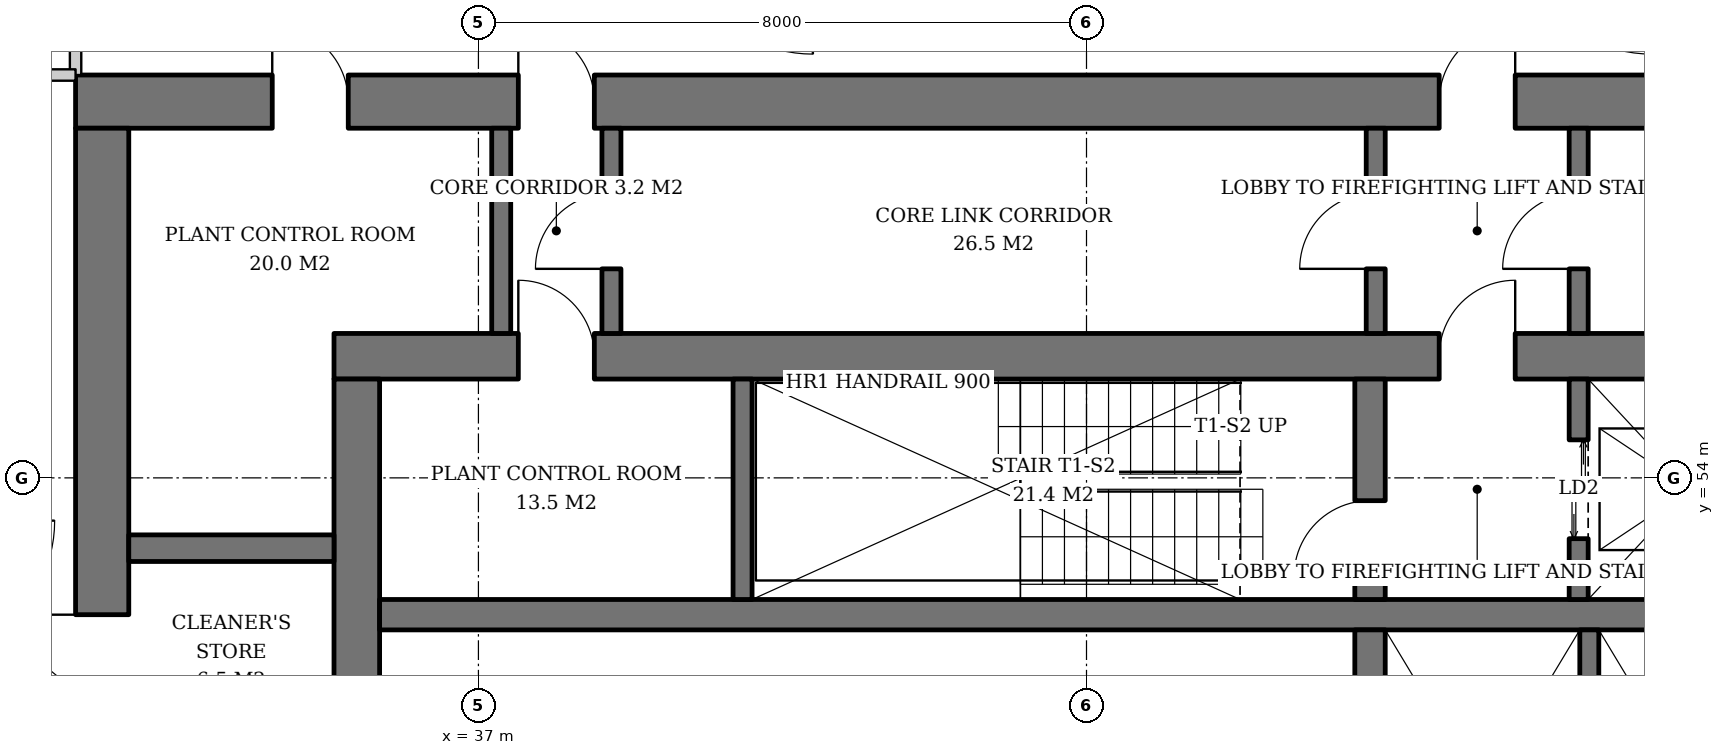
"""IFC4 building model, lengths in metres.
Left out: names, types, materials, properties, quantities, classifications, styles, units other than length and angle.
Written with IfcOpenShell. Run it as: python <this file> out.ifc"""

import sys

from ifc_helpers import new_model, si_unit, direction, frame, frame_2d, origin, origin_2d, place, context, subcontext, project, spatial, rectangle, extrude, element, fill, save


model = new_model("IFC4")
c1 = context("Model", 3, precision=1e-05, world=origin(), true_north=direction((0.0, 1.0)))
c2 = subcontext(c1, "Body", "Model", "MODEL_VIEW")
j1 = project(units=[si_unit("LENGTHUNIT", "METRE"), si_unit("PLANEANGLEUNIT", "RADIAN")], contexts=[c1])
p1 = place(None, origin())
s1 = spatial("IfcSite", under=j1, at=p1, CompositionType="ELEMENT")
p2 = place(p1, origin())
s2 = spatial("IfcBuilding", under=s1, at=p2, CompositionType="ELEMENT")
p3 = place(p2, frame((0.0, 0.0, 157.8)))
s3 = spatial("IfcBuildingStorey", under=s2, at=p3, CompositionType="ELEMENT", Elevation=157.8)
p4 = place(p3, frame((29.471, 61.529, 0.0), z_axis=(0.031898107953, -0.031898107953, 0.998981992539), x_axis=(0.707106781187, 0.707106781187, 0.0)))
e1 = element("IfcColumn", 1, at=p4, inside=s3, PredefinedType="COLUMN", context=c2, shape_type="SweptSolid", body=[
    extrude(rectangle(XDim=2.6, YDim=2.6, at=origin_2d()), origin(), (0.0, 0.0, 1.0), 3.804),
])
p5 = place(p3, frame((35.1, 55.6, 0.0), z_axis=(0.0, 0.0, 1.0), x_axis=(1.0, 0.0, 0.0)))
e2 = element("IfcWall", 2, at=p5, inside=s3, PredefinedType="SHEAR", context=c2, shape_type="SweptSolid", body=[
    extrude(rectangle(XDim=19.8, YDim=0.6, at=frame_2d((9.9, 0.0))), origin(), (0.0, 0.0, 1.0), 3.8),
])
p6 = place(p5, frame((14.54, 0.0, 0.0)))
e3 = element("IfcOpeningElement", 3, at=p6, cuts=e2, PredefinedType="OPENING", context=c2, shape_type="SweptSolid", body=[
    extrude(rectangle(XDim=1.0, YDim=2.1, at=frame_2d((0.5, 1.05))), frame((0.0, 0.31, 0.0), z_axis=(0.0, -1.0, 0.0), x_axis=(1.0, 0.0, 0.0)), (0.0, 0.0, 1.0), 0.62),
])
p7 = place(p5, frame((2.425, 0.0, 0.0)))
e4 = element("IfcOpeningElement", 4, at=p7, cuts=e2, PredefinedType="OPENING", context=c2, shape_type="SweptSolid", body=[
    extrude(rectangle(XDim=1.0, YDim=2.1, at=frame_2d((0.5, 1.05))), frame((0.0, 0.31, 0.0), z_axis=(0.0, -1.0, 0.0), x_axis=(1.0, 0.0, 0.0)), (0.0, 0.0, 1.0), 0.62),
])
p8 = place(p3, frame((35.4, 36.7, 0.0), z_axis=(0.0, 0.0, 1.0), x_axis=(0.0, 1.0, 0.0)))
e5 = element("IfcWall", 5, at=p8, inside=s3, PredefinedType="SHEAR", context=c2, shape_type="SweptSolid", body=[
    extrude(rectangle(XDim=18.6, YDim=0.6, at=frame_2d((9.3, 0.0))), origin(), (0.0, 0.0, 1.0), 3.8),
])
p9 = place(p8, frame((8.4, 0.0, 0.0)))
e6 = element("IfcOpeningElement", 6, at=p9, cuts=e5, PredefinedType="OPENING", context=c2, shape_type="SweptSolid", body=[
    extrude(rectangle(XDim=1.8, YDim=2.4, at=frame_2d((0.9, 1.2))), frame((0.0, 0.31, 0.0), z_axis=(0.0, -1.0, 0.0), x_axis=(1.0, 0.0, 0.0)), (0.0, 0.0, 1.0), 0.62),
])
p10 = place(p3, frame((31.7, 58.95, 0.0), z_axis=(0.0, 0.0, 1.0), x_axis=(1.0, 0.0, 0.0)))
e7 = element("IfcWall", 7, at=p10, inside=s3, PredefinedType="SHEAR", context=c2, shape_type="SweptSolid", body=[
    extrude(rectangle(XDim=26.6, YDim=0.7, at=frame_2d((13.3, 0.0))), origin(), (0.0, 0.0, 1.0), 3.8),
])
p11 = place(p10, frame((17.94, 0.0, 0.0)))
e8 = element("IfcOpeningElement", 8, at=p11, cuts=e7, PredefinedType="OPENING", context=c2, shape_type="SweptSolid", body=[
    extrude(rectangle(XDim=1.0, YDim=2.1, at=frame_2d((0.5, 1.05))), frame((0.0, 0.36, 0.0), z_axis=(0.0, -1.0, 0.0), x_axis=(1.0, 0.0, 0.0)), (0.0, 0.0, 1.0), 0.72),
])
p12 = place(p10, frame((5.825, 0.0, 0.0)))
e9 = element("IfcOpeningElement", 9, at=p12, cuts=e7, PredefinedType="OPENING", context=c2, shape_type="SweptSolid", body=[
    extrude(rectangle(XDim=1.0, YDim=2.1, at=frame_2d((0.5, 1.05))), frame((0.0, 0.36, 0.0), z_axis=(0.0, -1.0, 0.0), x_axis=(1.0, 0.0, 0.0)), (0.0, 0.0, 1.0), 0.72),
])
p13 = place(p10, frame((2.587, 0.0, 0.0)))
e10 = element("IfcOpeningElement", 10, at=p13, cuts=e7, PredefinedType="OPENING", context=c2, shape_type="SweptSolid", body=[
    extrude(rectangle(XDim=1.0, YDim=2.1, at=frame_2d((0.5, 1.05))), frame((0.0, 0.36, 0.0), z_axis=(0.0, -1.0, 0.0), x_axis=(1.0, 0.0, 0.0)), (0.0, 0.0, 1.0), 0.72),
])
p14 = place(p3, frame((32.05, 33.4, 0.0), z_axis=(0.0, 0.0, 1.0), x_axis=(0.0, 1.0, 0.0)))
e11 = element("IfcWall", 11, at=p14, inside=s3, PredefinedType="SHEAR", context=c2, shape_type="SweptSolid", body=[
    extrude(rectangle(XDim=25.2, YDim=0.7, at=frame_2d((12.6, 0.0))), origin(), (0.0, 0.0, 1.0), 3.8),
])
p15 = place(p14, frame((11.7, 0.0, 0.0)))
e12 = element("IfcOpeningElement", 12, at=p15, cuts=e11, PredefinedType="OPENING", context=c2, shape_type="SweptSolid", body=[
    extrude(rectangle(XDim=1.8, YDim=2.4, at=frame_2d((0.9, 1.2))), frame((0.0, 0.36, 0.0), z_axis=(0.0, -1.0, 0.0), x_axis=(1.0, 0.0, 0.0)), (0.0, 0.0, 1.0), 0.72),
])
p16 = place(p14, frame((3.575, 0.0, 0.0)))
e13 = element("IfcOpeningElement", 13, at=p16, cuts=e11, PredefinedType="OPENING", context=c2, shape_type="SweptSolid", body=[
    extrude(rectangle(XDim=1.0, YDim=2.1, at=frame_2d((0.5, 1.05))), frame((0.0, 0.36, 0.0), z_axis=(0.0, -1.0, 0.0), x_axis=(1.0, 0.0, 0.0)), (0.0, 0.0, 1.0), 0.72),
])
p17 = place(p14, frame((6.375, 0.0, 0.0)))
e14 = element("IfcOpeningElement", 14, at=p17, cuts=e11, PredefinedType="OPENING", context=c2, shape_type="SweptSolid", body=[
    extrude(rectangle(XDim=1.0, YDim=2.1, at=frame_2d((0.5, 1.05))), frame((0.0, 0.36, 0.0), z_axis=(0.0, -1.0, 0.0), x_axis=(1.0, 0.0, 0.0)), (0.0, 0.0, 1.0), 0.72),
])
p18 = place(p14, frame((9.1, 0.0, 0.0)))
e15 = element("IfcOpeningElement", 15, at=p18, cuts=e11, PredefinedType="OPENING", context=c2, shape_type="SweptSolid", body=[
    extrude(rectangle(XDim=1.0, YDim=2.1, at=frame_2d((0.5, 1.05))), frame((0.0, 0.36, 0.0), z_axis=(0.0, -1.0, 0.0), x_axis=(1.0, 0.0, 0.0)), (0.0, 0.0, 1.0), 0.72),
])
p19 = place(p14, frame((15.1, 0.0, 0.0)))
e16 = element("IfcOpeningElement", 16, at=p19, cuts=e11, PredefinedType="OPENING", context=c2, shape_type="SweptSolid", body=[
    extrude(rectangle(XDim=1.0, YDim=2.1, at=frame_2d((0.5, 1.05))), frame((0.0, 0.36, 0.0), z_axis=(0.0, -1.0, 0.0), x_axis=(1.0, 0.0, 0.0)), (0.0, 0.0, 1.0), 0.72),
])
p20 = place(p14, frame((17.8, 0.0, 0.0)))
e17 = element("IfcOpeningElement", 17, at=p20, cuts=e11, PredefinedType="OPENING", context=c2, shape_type="SweptSolid", body=[
    extrude(rectangle(XDim=1.0, YDim=2.1, at=frame_2d((0.5, 1.05))), frame((0.0, 0.36, 0.0), z_axis=(0.0, -1.0, 0.0), x_axis=(1.0, 0.0, 0.0)), (0.0, 0.0, 1.0), 0.72),
])
p21 = place(p3, frame((35.7, 52.2, 0.0), z_axis=(0.0, 0.0, 1.0), x_axis=(1.0, 0.0, 0.0)))
e18 = element("IfcWall", 18, at=p21, inside=s3, PredefinedType="SHEAR", context=c2, shape_type="SweptSolid", body=[
    extrude(rectangle(XDim=18.6, YDim=0.4, at=frame_2d((9.3, 0.0))), origin(), (0.0, 0.0, 1.0), 3.8),
])
p22 = place(p3, frame((48.73, 40.0, 0.0), z_axis=(0.0, 0.0, 1.0), x_axis=(0.0, 1.0, 0.0)))
e19 = element("IfcWall", 19, at=p22, inside=s3, PredefinedType="SHEAR", context=c2, shape_type="SweptSolid", body=[
    extrude(rectangle(XDim=12.0, YDim=0.4, at=frame_2d((6.0, 0.0))), origin(), (0.0, 0.0, 1.0), 3.8),
])
p23 = place(p22, frame((5.5, 0.0, 0.0)))
e20 = element("IfcOpeningElement", 20, at=p23, cuts=e19, PredefinedType="OPENING", context=c2, shape_type="SweptSolid", body=[
    extrude(rectangle(XDim=1.0, YDim=2.1, at=frame_2d((0.5, 1.05))), frame((0.0, 0.21, 0.0), z_axis=(0.0, -1.0, 0.0), x_axis=(1.0, 0.0, 0.0)), (0.0, 0.0, 1.0), 0.42),
])
p24 = place(p3, frame((48.73, 52.4, 0.0), z_axis=(0.0, 0.0, 1.0), x_axis=(0.0, 1.0, 0.0)))
e21 = element("IfcWall", 21, at=p24, inside=s3, PredefinedType="SHEAR", context=c2, shape_type="SweptSolid", body=[
    extrude(rectangle(XDim=2.9, YDim=0.4, at=frame_2d((1.45, 0.0))), origin(), (0.0, 0.0, 1.0), 3.8),
])
p25 = place(p24, frame((0.3, 0.0, 0.0)))
e22 = element("IfcOpeningElement", 22, at=p25, cuts=e21, PredefinedType="OPENING", context=c2, shape_type="SweptSolid", body=[
    extrude(rectangle(XDim=1.0, YDim=2.1, at=frame_2d((0.5, 1.05))), frame((0.0, 0.21, 0.0), z_axis=(0.0, -1.0, 0.0), x_axis=(1.0, 0.0, 0.0)), (0.0, 0.0, 1.0), 0.42),
])
p26 = place(p3, frame((40.475, 52.4, 0.0), z_axis=(0.0, 0.0, 1.0), x_axis=(0.0, 1.0, 0.0)))
e23 = element("IfcWall", 23, at=p26, inside=s3, PredefinedType="SHEAR", context=c2, shape_type="SweptSolid", body=[
    extrude(rectangle(XDim=2.9, YDim=0.25, at=frame_2d((1.45, 0.0))), origin(), (0.0, 0.0, 1.0), 3.8),
])
p27 = place(p3, frame((51.475, 52.4, 0.0), z_axis=(0.0, 0.0, 1.0), x_axis=(0.0, 1.0, 0.0)))
e24 = element("IfcWall", 24, at=p27, inside=s3, PredefinedType="SHEAR", context=c2, shape_type="SweptSolid", body=[
    extrude(rectangle(XDim=2.9, YDim=0.25, at=frame_2d((1.45, 0.0))), origin(), (0.0, 0.0, 1.0), 3.8),
])
p28 = place(p27, frame((0.8, 0.0, 0.0)))
e25 = element("IfcOpeningElement", 25, at=p28, cuts=e24, PredefinedType="OPENING", context=c2, shape_type="SweptSolid", body=[
    extrude(rectangle(XDim=1.3, YDim=2.2, at=frame_2d((0.65, 1.1))), frame((0.0, 0.135, 0.0), z_axis=(0.0, -1.0, 0.0), x_axis=(1.0, 0.0, 0.0)), (0.0, 0.0, 1.0), 0.27),
])
p29 = place(p3, frame((51.615, 47.75, 0.0), z_axis=(0.0, 0.0, 1.0), x_axis=(0.0, 1.0, 0.0)))
e26 = element("IfcWall", 26, at=p29, inside=s3, PredefinedType="SHEAR", context=c2, shape_type="SweptSolid", body=[
    extrude(rectangle(XDim=4.25, YDim=0.25, at=frame_2d((2.125, 0.0))), origin(), (0.0, 0.0, 1.0), 3.8),
])
p30 = place(p3, frame((32.4, 53.075, 0.0), z_axis=(0.0, 0.0, 1.0), x_axis=(1.0, 0.0, 0.0)))
e27 = element("IfcWall", 27, at=p30, inside=s3, PredefinedType="SHEAR", context=c2, shape_type="SweptSolid", body=[
    extrude(rectangle(XDim=2.7, YDim=0.35, at=frame_2d((1.35, 0.0))), origin(), (0.0, 0.0, 1.0), 3.8),
])
p31 = place(p3, frame((48.805, 55.9, 0.0), z_axis=(0.0, 0.0, 1.0), x_axis=(0.0, 1.0, 0.0)))
e28 = element("IfcWall", 28, at=p31, inside=s3, PredefinedType="SOLIDWALL", context=c2, shape_type="SweptSolid", body=[
    extrude(rectangle(XDim=2.7, YDim=0.25, at=frame_2d((1.35, 0.0))), origin(), (0.0, 0.0, 1.0), 3.52),
])
p32 = place(p31, frame((0.85, 0.0, 0.0)))
e29 = element("IfcOpeningElement", 29, at=p32, cuts=e28, PredefinedType="OPENING", context=c2, shape_type="SweptSolid", body=[
    extrude(rectangle(XDim=1.0, YDim=2.1, at=frame_2d((0.5, 1.05))), frame((0.0, 0.135, 0.0), z_axis=(0.0, -1.0, 0.0), x_axis=(1.0, 0.0, 0.0)), (0.0, 0.0, 1.0), 0.27),
])
p33 = place(p3, frame((51.475, 55.9, 0.0), z_axis=(0.0, 0.0, 1.0), x_axis=(0.0, 1.0, 0.0)))
e30 = element("IfcWall", 30, at=p33, inside=s3, PredefinedType="SOLIDWALL", context=c2, shape_type="SweptSolid", body=[
    extrude(rectangle(XDim=2.7, YDim=0.25, at=frame_2d((1.35, 0.0))), origin(), (0.0, 0.0, 1.0), 3.52),
])
p34 = place(p33, frame((0.85, 0.0, 0.0)))
e31 = element("IfcOpeningElement", 31, at=p34, cuts=e30, PredefinedType="OPENING", context=c2, shape_type="SweptSolid", body=[
    extrude(rectangle(XDim=1.0, YDim=2.1, at=frame_2d((0.5, 1.05))), frame((0.0, 0.135, 0.0), z_axis=(0.0, -1.0, 0.0), x_axis=(1.0, 0.0, 0.0)), (0.0, 0.0, 1.0), 0.27),
])
p35 = place(p3, frame((37.3, 55.9, 0.0), z_axis=(0.0, 0.0, 1.0), x_axis=(0.0, 1.0, 0.0)))
e32 = element("IfcWall", 32, at=p35, inside=s3, PredefinedType="SOLIDWALL", context=c2, shape_type="SweptSolid", body=[
    extrude(rectangle(XDim=2.7, YDim=0.25, at=frame_2d((1.35, 0.0))), origin(), (0.0, 0.0, 1.0), 3.52),
])
p36 = place(p3, frame((38.75, 55.9, 0.0), z_axis=(0.0, 0.0, 1.0), x_axis=(0.0, 1.0, 0.0)))
e33 = element("IfcWall", 33, at=p36, inside=s3, PredefinedType="SOLIDWALL", context=c2, shape_type="SweptSolid", body=[
    extrude(rectangle(XDim=2.7, YDim=0.25, at=frame_2d((1.35, 0.0))), origin(), (0.0, 0.0, 1.0), 3.52),
])
p37 = place(p36, frame((0.85, 0.0, 0.0)))
e34 = element("IfcOpeningElement", 34, at=p37, cuts=e33, PredefinedType="OPENING", context=c2, shape_type="SweptSolid", body=[
    extrude(rectangle(XDim=1.0, YDim=2.1, at=frame_2d((0.5, 1.05))), frame((0.0, 0.135, 0.0), z_axis=(0.0, -1.0, 0.0), x_axis=(1.0, 0.0, 0.0)), (0.0, 0.0, 1.0), 0.27),
])
for number, where, z_axis, x_axis in (
    (35, (31.7, 59.3, 0.0), (0.0, 0.0, 1.0), (0.0, 1.0, 0.0)),
    (36, (31.7, 59.3, 0.0), (0.0, 0.0, 1.0), (-1.0, 0.0, 0.0)),
):
    element("IfcWall", number, at=place(p3, frame(where, z_axis=z_axis, x_axis=x_axis)), inside=s3, PredefinedType="PARTITIONING", context=c2, shape_type="SweptSolid", body=[
        extrude(rectangle(XDim=1.917, YDim=0.15, at=frame_2d((0.958, 0.0))), origin(), (0.0, 0.0, 1.0), 3.52),
    ])
p38 = place(p28, origin())
e37 = element("IfcDoor", 37, at=p38, inside=s3, OperationType="DOUBLE_DOOR_SLIDING", PredefinedType="DOOR", context=c2, shape_type="SweptSolid", body=[
    extrude(rectangle(XDim=1.3, YDim=2.2, at=frame_2d((0.65, 1.1))), frame((0.0, 0.025, 0.0), z_axis=(0.0, -1.0, 0.0), x_axis=(1.0, 0.0, 0.0)), (0.0, 0.0, 1.0), 0.05),
])
fill(e25, e37)
p39 = place(p32, origin())
e38 = element("IfcDoor", 38, at=p39, inside=s3, OperationType="SINGLE_SWING_LEFT", PredefinedType="DOOR", context=c2, shape_type="SweptSolid", body=[
    extrude(rectangle(XDim=1.0, YDim=2.1, at=frame_2d((0.5, 1.05))), frame((0.0, 0.025, 0.0), z_axis=(0.0, -1.0, 0.0), x_axis=(1.0, 0.0, 0.0)), (0.0, 0.0, 1.0), 0.05),
])
fill(e29, e38)
p40 = place(p34, origin())
e39 = element("IfcDoor", 39, at=p40, inside=s3, OperationType="SINGLE_SWING_LEFT", PredefinedType="DOOR", context=c2, shape_type="SweptSolid", body=[
    extrude(rectangle(XDim=1.0, YDim=2.1, at=frame_2d((0.5, 1.05))), frame((0.0, 0.025, 0.0), z_axis=(0.0, -1.0, 0.0), x_axis=(1.0, 0.0, 0.0)), (0.0, 0.0, 1.0), 0.05),
])
fill(e31, e39)
p41 = place(p37, origin())
e40 = element("IfcDoor", 40, at=p41, inside=s3, OperationType="SINGLE_SWING_LEFT", PredefinedType="DOOR", context=c2, shape_type="SweptSolid", body=[
    extrude(rectangle(XDim=1.0, YDim=2.1, at=frame_2d((0.5, 1.05))), frame((0.0, 0.025, 0.0), z_axis=(0.0, -1.0, 0.0), x_axis=(1.0, 0.0, 0.0)), (0.0, 0.0, 1.0), 0.05),
])
fill(e34, e40)
p42 = place(p25, origin())
e41 = element("IfcDoor", 41, at=p42, inside=s3, OperationType="SINGLE_SWING_LEFT", PredefinedType="DOOR", context=c2, shape_type="SweptSolid", body=[
    extrude(rectangle(XDim=1.0, YDim=2.1, at=frame_2d((0.5, 1.05))), frame((0.0, 0.025, 0.0), z_axis=(0.0, -1.0, 0.0), x_axis=(1.0, 0.0, 0.0)), (0.0, 0.0, 1.0), 0.05),
])
fill(e22, e41)
p43 = place(p6, origin())
e42 = element("IfcDoor", 42, at=p43, inside=s3, OperationType="SINGLE_SWING_RIGHT", PredefinedType="DOOR", context=c2, shape_type="SweptSolid", body=[
    extrude(rectangle(XDim=1.0, YDim=2.1, at=frame_2d((0.5, 1.05))), frame((0.0, 0.025, 0.0), z_axis=(0.0, -1.0, 0.0), x_axis=(1.0, 0.0, 0.0)), (0.0, 0.0, 1.0), 0.05),
])
fill(e3, e42)
p44 = place(p11, origin())
e43 = element("IfcDoor", 43, at=p44, inside=s3, OperationType="SINGLE_SWING_RIGHT", PredefinedType="DOOR", context=c2, shape_type="SweptSolid", body=[
    extrude(rectangle(XDim=1.0, YDim=2.1, at=frame_2d((0.5, 1.05))), frame((0.0, 0.025, 0.0), z_axis=(0.0, -1.0, 0.0), x_axis=(1.0, 0.0, 0.0)), (0.0, 0.0, 1.0), 0.05),
])
fill(e8, e43)
p45 = place(p12, origin())
e44 = element("IfcDoor", 44, at=p45, inside=s3, OperationType="SINGLE_SWING_LEFT", PredefinedType="DOOR", context=c2, shape_type="SweptSolid", body=[
    extrude(rectangle(XDim=1.0, YDim=2.1, at=frame_2d((0.5, 1.05))), frame((0.0, 0.025, 0.0), z_axis=(0.0, -1.0, 0.0), x_axis=(1.0, 0.0, 0.0)), (0.0, 0.0, 1.0), 0.05),
])
fill(e9, e44)
p46 = place(p7, origin())
e45 = element("IfcDoor", 45, at=p46, inside=s3, OperationType="SINGLE_SWING_LEFT", PredefinedType="DOOR", context=c2, shape_type="SweptSolid", body=[
    extrude(rectangle(XDim=1.0, YDim=2.1, at=frame_2d((0.5, 1.05))), frame((0.0, -0.24, 0.0), z_axis=(0.0, -1.0, 0.0), x_axis=(1.0, 0.0, 0.0)), (0.0, 0.0, 1.0), 0.05),
])
fill(e4, e45)
p47 = place(p20, origin())
e46 = element("IfcDoor", 46, at=p47, inside=s3, OperationType="SINGLE_SWING_RIGHT", PredefinedType="DOOR", context=c2, shape_type="SweptSolid", body=[
    extrude(rectangle(XDim=1.0, YDim=2.1, at=frame_2d((0.5, 1.05))), frame((0.0, -0.29, 0.0), z_axis=(0.0, -1.0, 0.0), x_axis=(1.0, 0.0, 0.0)), (0.0, 0.0, 1.0), 0.05),
])
fill(e17, e46)
p48 = place(p13, origin())
e47 = element("IfcDoor", 47, at=p48, inside=s3, OperationType="SINGLE_SWING_LEFT", PredefinedType="DOOR", context=c2, shape_type="SweptSolid", body=[
    extrude(rectangle(XDim=1.0, YDim=2.1, at=frame_2d((0.5, 1.05))), frame((0.0, -0.29, 0.0), z_axis=(0.0, -1.0, 0.0), x_axis=(1.0, 0.0, 0.0)), (0.0, 0.0, 1.0), 0.05),
])
fill(e10, e47)
save(model, sys.argv[1])
